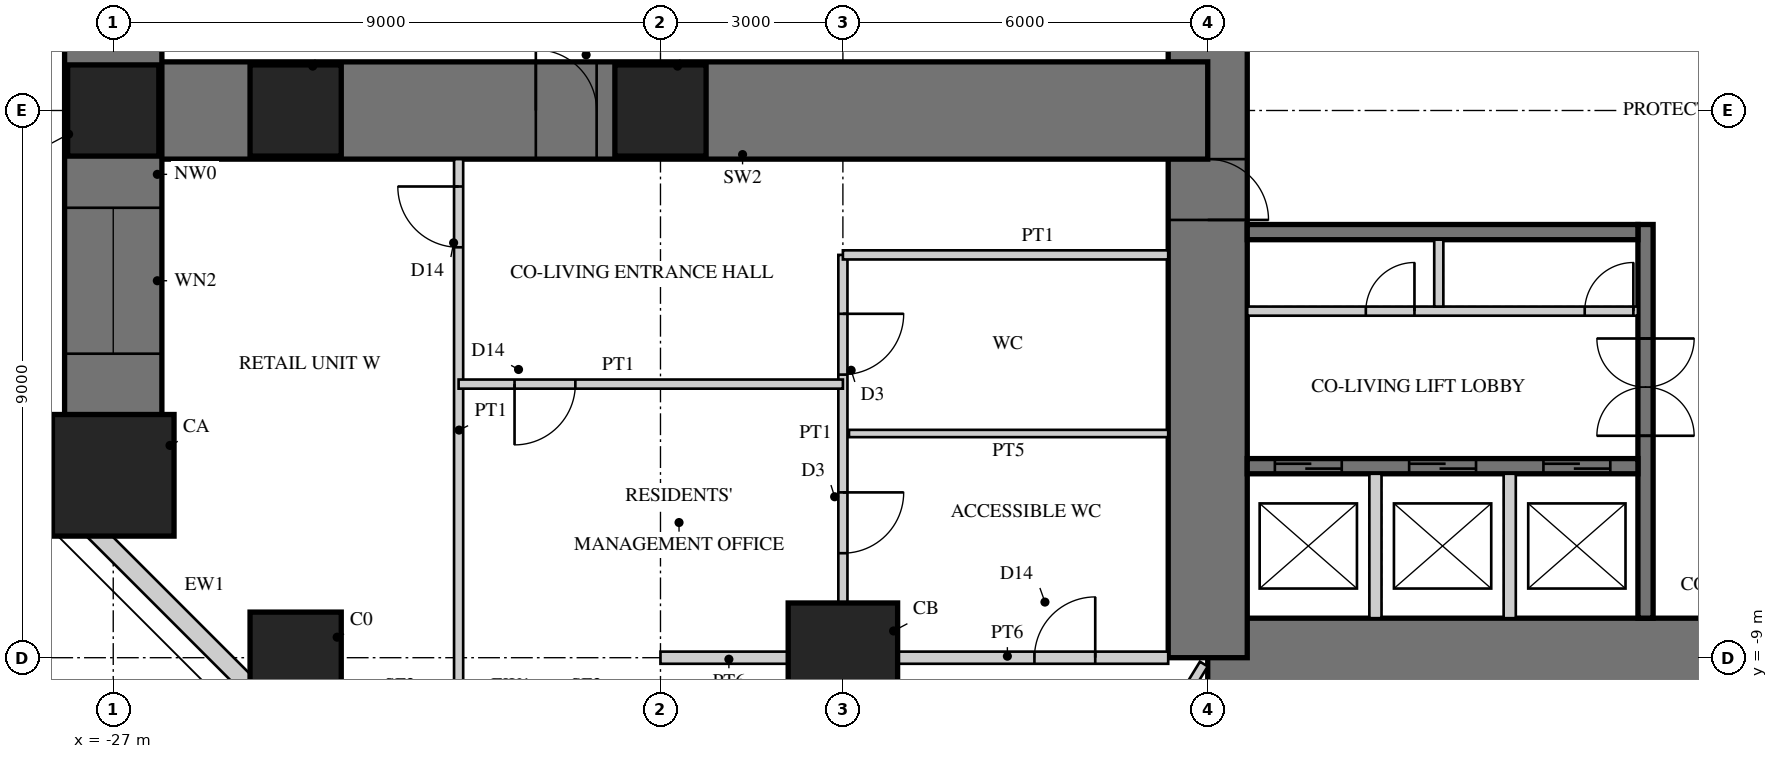
"""IFC4 building model, lengths in metres.
Left out: names, types, materials, properties, quantities, classifications, styles, units other than length and angle.
Written with IfcOpenShell. Run it as: python <this file> out.ifc"""

import sys

from ifc_helpers import new_model, si_unit, direction, frame, frame_2d, origin, origin_2d, place, context, subcontext, project, spatial, rectangle, hollow_rectangle, extrude, element, fill, save


model = new_model("IFC4")
c1 = context("Model", 3, precision=1e-05, world=origin(), true_north=direction((0.0, 1.0)))
c2 = subcontext(c1, "Body", "Model", "MODEL_VIEW")
j1 = project(units=[si_unit("LENGTHUNIT", "METRE"), si_unit("PLANEANGLEUNIT", "RADIAN")], contexts=[c1])
p1 = place(None, origin())
s1 = spatial("IfcSite", under=j1, at=p1, CompositionType="ELEMENT")
p2 = place(p1, origin())
s2 = spatial("IfcBuilding", under=s1, at=p2, CompositionType="ELEMENT")
p3 = place(p2, origin())
s3 = spatial("IfcBuildingStorey", under=s2, at=p3, CompositionType="ELEMENT", Elevation=0.0)
p4 = place(p3, frame((-9.0, -9.0, 0.0), z_axis=(0.0, 0.0, 1.0), x_axis=(1.0, 0.0, 0.0)))
e1 = element("IfcWall", 1, at=p4, inside=s3, PredefinedType="SHEAR", context=c2, shape_type="SweptSolid", body=[
    extrude(rectangle(XDim=18.0, YDim=1.3, at=frame_2d((9.0, 0.0))), origin(), (0.0, 0.0, 1.0), 5.0),
])
p5 = place(p4, frame((9.8, 0.0, 0.0)))
e2 = element("IfcOpeningElement", 2, at=p5, cuts=e1, PredefinedType="OPENING", context=c2, shape_type="SweptSolid", body=[
    extrude(rectangle(XDim=1.0, YDim=2.4, at=frame_2d((0.5, 1.2))), frame((0.0, 0.66, 0.0), z_axis=(0.0, -1.0, 0.0), x_axis=(1.0, 0.0, 0.0)), (0.0, 0.0, 1.0), 1.32),
])
p6 = place(p3, frame((-9.0, 9.0, 0.0), z_axis=(0.0, 0.0, 1.0), x_axis=(0.0, -1.0, 0.0)))
e3 = element("IfcWall", 3, at=p6, inside=s3, PredefinedType="SHEAR", context=c2, shape_type="SweptSolid", body=[
    extrude(rectangle(XDim=18.0, YDim=1.3, at=frame_2d((9.0, 0.0))), origin(), (0.0, 0.0, 1.0), 5.0),
])
p7 = place(p6, frame((9.8, 0.0, 0.0)))
e4 = element("IfcOpeningElement", 4, at=p7, cuts=e3, PredefinedType="OPENING", context=c2, shape_type="SweptSolid", body=[
    extrude(rectangle(XDim=1.0, YDim=2.4, at=frame_2d((0.5, 1.2))), frame((0.0, 0.66, 0.0), z_axis=(0.0, -1.0, 0.0), x_axis=(1.0, 0.0, 0.0)), (0.0, 0.0, 1.0), 1.32),
])
p8 = place(p3, frame((-1.8, -1.875, 0.0), z_axis=(0.0, 0.0, 1.0), x_axis=(0.0, -1.0, 0.0)))
e5 = element("IfcWall", 5, at=p8, inside=s3, PredefinedType="SHEAR", context=c2, shape_type="SweptSolid", body=[
    extrude(rectangle(XDim=6.475, YDim=0.25, at=frame_2d((3.238, 0.0))), origin(), (0.0, 0.0, 1.0), 5.0),
])
p9 = place(p8, frame((1.875, 0.0, 0.0)))
e6 = element("IfcOpeningElement", 6, at=p9, cuts=e5, PredefinedType="OPENING", context=c2, shape_type="SweptSolid", body=[
    extrude(rectangle(XDim=1.6, YDim=2.4, at=frame_2d((0.8, 1.2))), frame((0.0, 0.135, 0.0), z_axis=(0.0, -1.0, 0.0), x_axis=(1.0, 0.0, 0.0)), (0.0, 0.0, 1.0), 0.27),
])
p10 = place(p3, frame((-1.925, -2.0, 0.0), z_axis=(0.0, 0.0, 1.0), x_axis=(-1.0, 0.0, 0.0)))
e7 = element("IfcWall", 7, at=p10, inside=s3, PredefinedType="SHEAR", context=c2, shape_type="SweptSolid", body=[
    extrude(rectangle(XDim=6.425, YDim=0.25, at=frame_2d((3.212, 0.0))), origin(), (0.0, 0.0, 1.0), 5.0),
])
p11 = place(p3, frame((-1.925, -5.85, 0.0), z_axis=(0.0, 0.0, 1.0), x_axis=(-1.0, 0.0, 0.0)))
e8 = element("IfcWall", 8, at=p11, inside=s3, PredefinedType="SHEAR", context=c2, shape_type="SweptSolid", body=[
    extrude(rectangle(XDim=6.425, YDim=0.25, at=frame_2d((3.212, 0.0))), origin(), (0.0, 0.0, 1.0), 5.0),
])
p12 = place(p11, frame((0.454, 0.0, 0.0)))
e9 = element("IfcOpeningElement", 9, at=p12, cuts=e8, PredefinedType="OPENING", context=c2, shape_type="SweptSolid", body=[
    extrude(rectangle(XDim=1.1, YDim=2.2, at=frame_2d((0.55, 1.1))), frame((0.0, 0.135, 0.0), z_axis=(0.0, -1.0, 0.0), x_axis=(1.0, 0.0, 0.0)), (0.0, 0.0, 1.0), 0.27),
])
p13 = place(p11, frame((2.663, 0.0, 0.0)))
e10 = element("IfcOpeningElement", 10, at=p13, cuts=e8, PredefinedType="OPENING", context=c2, shape_type="SweptSolid", body=[
    extrude(rectangle(XDim=1.1, YDim=2.2, at=frame_2d((0.55, 1.1))), frame((0.0, 0.135, 0.0), z_axis=(0.0, -1.0, 0.0), x_axis=(1.0, 0.0, 0.0)), (0.0, 0.0, 1.0), 0.27),
])
p14 = place(p11, frame((4.871, 0.0, 0.0)))
e11 = element("IfcOpeningElement", 11, at=p14, cuts=e8, PredefinedType="OPENING", context=c2, shape_type="SweptSolid", body=[
    extrude(rectangle(XDim=1.1, YDim=2.2, at=frame_2d((0.55, 1.1))), frame((0.0, 0.135, 0.0), z_axis=(0.0, -1.0, 0.0), x_axis=(1.0, 0.0, 0.0)), (0.0, 0.0, 1.0), 0.27),
])
p15 = place(p3, frame((-1.925, -3.3, 0.0), z_axis=(0.0, 0.0, 1.0), x_axis=(-1.0, 0.0, 0.0)))
e12 = element("IfcWall", 12, at=p15, inside=s3, PredefinedType="PARTITIONING", context=c2, shape_type="SweptSolid", body=[
    extrude(rectangle(XDim=6.425, YDim=0.15, at=frame_2d((3.212, 0.0))), origin(), (0.0, 0.0, 1.0), 5.0),
])
p16 = place(p15, frame((0.075, 0.0, 0.0)))
e13 = element("IfcOpeningElement", 13, at=p16, cuts=e12, PredefinedType="OPENING", context=c2, shape_type="SweptSolid", body=[
    extrude(rectangle(XDim=0.8, YDim=2.1, at=frame_2d((0.4, 1.05))), frame((0.0, 0.085, 0.0), z_axis=(0.0, -1.0, 0.0), x_axis=(1.0, 0.0, 0.0)), (0.0, 0.0, 1.0), 0.17),
])
p17 = place(p15, frame((3.675, 0.0, 0.0)))
e14 = element("IfcOpeningElement", 14, at=p17, cuts=e12, PredefinedType="OPENING", context=c2, shape_type="SweptSolid", body=[
    extrude(rectangle(XDim=0.8, YDim=2.1, at=frame_2d((0.4, 1.05))), frame((0.0, 0.085, 0.0), z_axis=(0.0, -1.0, 0.0), x_axis=(1.0, 0.0, 0.0)), (0.0, 0.0, 1.0), 0.17),
])
p18 = place(p3, frame((-5.2, -2.125, 0.0), z_axis=(0.0, 0.0, 1.0), x_axis=(0.0, -1.0, 0.0)))
e15 = element("IfcWall", 15, at=p18, inside=s3, PredefinedType="PARTITIONING", context=c2, shape_type="SweptSolid", body=[
    extrude(rectangle(XDim=1.1, YDim=0.15, at=frame_2d((0.55, 0.0))), origin(), (0.0, 0.0, 1.0), 5.0),
])
for number, where, z_axis, x_axis in (
    (16, (-4.033, -5.975, 0.0), (0.0, 0.0, 1.0), (0.0, -1.0, 0.0)),
    (17, (-6.242, -5.975, 0.0), (0.0, 0.0, 1.0), (0.0, -1.0, 0.0)),
):
    element("IfcWall", number, at=place(p3, frame(where, z_axis=z_axis, x_axis=x_axis)), inside=s3, PredefinedType="PARTITIONING", context=c2, shape_type="SweptSolid", body=[
        extrude(rectangle(XDim=2.375, YDim=0.2, at=frame_2d((1.188, 0.0))), origin(), (0.0, 0.0, 1.0), 5.0),
    ])
p19 = place(p3, frame((-9.0, 0.0, 0.0), z_axis=(0.0, 0.0, 1.0), x_axis=(-1.0, 0.0, 0.0)))
e18 = element("IfcWall", 18, at=p19, inside=s3, PredefinedType="SHEAR", context=c2, shape_type="SweptSolid", body=[
    extrude(rectangle(XDim=18.0, YDim=1.6, at=frame_2d((9.0, 0.0))), origin(), (0.0, 0.0, 1.0), 5.0),
])
p20 = place(p19, frame((10.05, 0.0, 0.0)))
e19 = element("IfcOpeningElement", 19, at=p20, cuts=e18, PredefinedType="OPENING", context=c2, shape_type="SweptSolid", body=[
    extrude(rectangle(XDim=1.0, YDim=2.2, at=frame_2d((0.5, 1.1))), frame((0.0, 0.81, 0.0), z_axis=(0.0, -1.0, 0.0), x_axis=(1.0, 0.0, 0.0)), (0.0, 0.0, 1.0), 1.62),
])
p21 = place(p3, frame((-27.0, 6.0, 0.0), z_axis=(0.0, 0.0, 1.0), x_axis=(0.0, -1.0, 0.0)))
e20 = element("IfcWall", 20, at=p21, inside=s3, PredefinedType="SHEAR", context=c2, shape_type="SweptSolid", body=[
    extrude(rectangle(XDim=12.0, YDim=1.6, at=frame_2d((6.0, 0.0))), origin(), (0.0, 0.0, 1.0), 5.0),
])
p22 = place(p21, frame((2.75, 0.0, 0.0)))
e21 = element("IfcOpeningElement", 21, at=p22, cuts=e20, PredefinedType="OPENING", context=c2, shape_type="SweptSolid", body=[
    extrude(rectangle(XDim=2.0, YDim=2.6, at=frame_2d((1.0, 1.3))), frame((0.0, 0.81, 0.0), z_axis=(0.0, -1.0, 0.0), x_axis=(1.0, 0.0, 0.0)), (0.0, 0.0, 1.0), 1.62),
])
p23 = place(p21, frame((7.6, 0.0, 0.6)))
e22 = element("IfcOpeningElement", 22, at=p23, cuts=e20, PredefinedType="OPENING", context=c2, shape_type="SweptSolid", body=[
    extrude(rectangle(XDim=2.4, YDim=3.0, at=frame_2d((1.2, 1.5))), frame((0.0, 0.81, 0.0), z_axis=(0.0, -1.0, 0.0), x_axis=(1.0, 0.0, 0.0)), (0.0, 0.0, 1.0), 1.62),
])
p24 = place(p3, frame((-15.0, -9.0, 0.0), z_axis=(0.0, 0.0, 1.0), x_axis=(1.0, 0.0, 0.0)))
e23 = element("IfcColumn", 23, at=p24, inside=s3, PredefinedType="COLUMN", context=c2, shape_type="SweptSolid", body=[
    extrude(rectangle(XDim=1.8, YDim=1.8, at=origin_2d()), origin(), (0.0, 0.0, 1.0), 5.0),
])
for number, where, z_axis, x_axis in (
    (24, (-24.0, -9.0, 0.0), (0.0, 0.0, 1.0), (1.0, 0.0, 0.0)),
    (25, (-27.0, 0.0, 0.0), (0.0, 0.0, 1.0), (1.0, 0.0, 0.0)),
):
    element("IfcColumn", number, at=place(p3, frame(where, z_axis=z_axis, x_axis=x_axis)), inside=s3, PredefinedType="COLUMN", context=c2, shape_type="SweptSolid", body=[
        extrude(rectangle(XDim=1.5, YDim=1.5, at=origin_2d()), origin(), (0.0, 0.0, 1.0), 5.0),
    ])
p25 = place(p3, frame((-27.0, -6.0, 0.0), z_axis=(0.0, 0.0, 1.0), x_axis=(1.0, 0.0, 0.0)))
e26 = element("IfcColumn", 26, at=p25, inside=s3, PredefinedType="COLUMN", context=c2, shape_type="SweptSolid", body=[
    extrude(rectangle(XDim=2.0, YDim=2.0, at=origin_2d()), origin(), (0.0, 0.0, 1.0), 5.0),
])
for number, where, z_axis, x_axis in (
    (27, (-18.0, 0.0, 0.0), (0.0, 0.0, 1.0), (1.0, 0.0, 0.0)),
    (28, (-24.0, 0.0, 0.0), (0.0, 0.0, 1.0), (1.0, 0.0, 0.0)),
):
    element("IfcColumn", number, at=place(p3, frame(where, z_axis=z_axis, x_axis=x_axis)), inside=s3, PredefinedType="COLUMN", context=c2, shape_type="SweptSolid", body=[
        extrude(rectangle(XDim=1.5, YDim=1.5, at=origin_2d()), origin(), (0.0, 0.0, 1.0), 5.0),
    ])
p26 = place(p3, frame((-27.8, -6.43, 0.0), z_axis=(0.0, 0.0, 1.0), x_axis=(0.707106781187, -0.707106781187, 0.0)))
e29 = element("IfcWall", 29, at=p26, inside=s3, PredefinedType="SOLIDWALL", context=c2, shape_type="SweptSolid", body=[
    extrude(rectangle(XDim=4.865, YDim=0.3, at=frame_2d((2.432, 0.0))), origin(), (0.0, 0.0, 1.0), 4.8),
])
p27 = place(p3, frame((-15.0, -2.375, 0.0), z_axis=(0.0, 0.0, 1.0), x_axis=(0.0, -1.0, 0.0)))
e30 = element("IfcWall", 30, at=p27, inside=s3, PredefinedType="PARTITIONING", context=c2, shape_type="SweptSolid", body=[
    extrude(rectangle(XDim=5.875, YDim=0.15, at=frame_2d((2.938, 0.0))), origin(), (0.0, 0.0, 1.0), 3.85),
])
p28 = place(p27, frame((0.969, 0.0, 0.0)))
e31 = element("IfcOpeningElement", 31, at=p28, cuts=e30, PredefinedType="OPENING", context=c2, shape_type="SweptSolid", body=[
    extrude(rectangle(XDim=1.0, YDim=2.1, at=frame_2d((0.5, 1.05))), frame((0.0, 0.085, 0.0), z_axis=(0.0, -1.0, 0.0), x_axis=(1.0, 0.0, 0.0)), (0.0, 0.0, 1.0), 0.17),
])
p29 = place(p27, frame((3.906, 0.0, 0.0)))
e32 = element("IfcOpeningElement", 32, at=p29, cuts=e30, PredefinedType="OPENING", context=c2, shape_type="SweptSolid", body=[
    extrude(rectangle(XDim=1.0, YDim=2.1, at=frame_2d((0.5, 1.05))), frame((0.0, 0.085, 0.0), z_axis=(0.0, -1.0, 0.0), x_axis=(1.0, 0.0, 0.0)), (0.0, 0.0, 1.0), 0.17),
])
p30 = place(p3, frame((-9.65, -2.375, 0.0), z_axis=(0.0, 0.0, 1.0), x_axis=(-1.0, 0.0, 0.0)))
e33 = element("IfcWall", 33, at=p30, inside=s3, PredefinedType="PARTITIONING", context=c2, shape_type="SweptSolid", body=[
    extrude(rectangle(XDim=5.35, YDim=0.15, at=frame_2d((2.675, 0.0))), origin(), (0.0, 0.0, 1.0), 4.8),
])
p31 = place(p3, frame((-9.65, -5.312, 0.0), z_axis=(0.0, 0.0, 1.0), x_axis=(-1.0, 0.0, 0.0)))
e34 = element("IfcWall", 34, at=p31, inside=s3, PredefinedType="PLUMBINGWALL", context=c2, shape_type="SweptSolid", body=[
    extrude(rectangle(XDim=5.25, YDim=0.12, at=frame_2d((2.625, 0.0))), origin(), (0.0, 0.0, 1.0), 4.8),
])
p32 = place(p3, frame((-21.32, -0.8, 0.0), z_axis=(0.0, 0.0, 1.0), x_axis=(0.0, -1.0, 0.0)))
e35 = element("IfcWall", 35, at=p32, inside=s3, PredefinedType="PARTITIONING", context=c2, shape_type="SweptSolid", body=[
    extrude(rectangle(XDim=8.92, YDim=0.15, at=frame_2d((4.46, 0.0))), origin(), (0.0, 0.0, 1.0), 4.8),
])
p33 = place(p32, frame((0.45, 0.0, 0.0)))
e36 = element("IfcOpeningElement", 36, at=p33, cuts=e35, PredefinedType="OPENING", context=c2, shape_type="SweptSolid", body=[
    extrude(rectangle(XDim=1.0, YDim=2.2, at=frame_2d((0.5, 1.1))), frame((0.0, 0.085, 0.0), z_axis=(0.0, -1.0, 0.0), x_axis=(1.0, 0.0, 0.0)), (0.0, 0.0, 1.0), 0.17),
])
p34 = place(p3, frame((-15.0, -4.5, 0.0), z_axis=(0.0, 0.0, 1.0), x_axis=(-1.0, 0.0, 0.0)))
e37 = element("IfcWall", 37, at=p34, inside=s3, PredefinedType="PARTITIONING", context=c2, shape_type="SweptSolid", body=[
    extrude(rectangle(XDim=6.32, YDim=0.15, at=frame_2d((3.16, 0.0))), origin(), (0.0, 0.0, 1.0), 4.8),
])
p35 = place(p34, frame((4.4, 0.0, 0.0)))
e38 = element("IfcOpeningElement", 38, at=p35, cuts=e37, PredefinedType="OPENING", context=c2, shape_type="SweptSolid", body=[
    extrude(rectangle(XDim=1.0, YDim=2.2, at=frame_2d((0.5, 1.1))), frame((0.0, 0.085, 0.0), z_axis=(0.0, -1.0, 0.0), x_axis=(1.0, 0.0, 0.0)), (0.0, 0.0, 1.0), 0.17),
])
p36 = place(p3, frame((-9.064, -9.104, 0.0), z_axis=(0.0, 0.0, 1.0), x_axis=(-0.522444037035, -0.852673576562, 0.0)))
e39 = element("IfcWall", 39, at=p36, inside=s3, PredefinedType="PARTITIONING", context=c2, shape_type="SweptSolid", body=[
    extrude(rectangle(XDim=1.261, YDim=0.15, at=frame_2d((0.631, 0.0))), origin(), (0.0, 0.0, 1.0), 3.9),
])
p37 = place(p3, frame((-9.65, -9.0, 0.0), z_axis=(0.0, 0.0, 1.0), x_axis=(-1.0, 0.0, 0.0)))
e40 = element("IfcWall", 40, at=p37, inside=s3, PredefinedType="SOLIDWALL", context=c2, shape_type="SweptSolid", body=[
    extrude(rectangle(XDim=4.6, YDim=0.2, at=frame_2d((2.3, 0.0))), origin(), (0.0, 0.0, 1.0), 3.8),
])
p38 = place(p37, frame((1.2, 0.0, 0.0)))
e41 = element("IfcOpeningElement", 41, at=p38, cuts=e40, PredefinedType="OPENING", context=c2, shape_type="SweptSolid", body=[
    extrude(rectangle(XDim=1.0, YDim=2.2, at=frame_2d((0.5, 1.1))), frame((0.0, 0.11, 0.0), z_axis=(0.0, -1.0, 0.0), x_axis=(1.0, 0.0, 0.0)), (0.0, 0.0, 1.0), 0.22),
])
p39 = place(p3, frame((-15.75, -9.0, 0.0), z_axis=(0.0, 0.0, 1.0), x_axis=(-1.0, 0.0, 0.0)))
e42 = element("IfcWall", 42, at=p39, inside=s3, PredefinedType="SOLIDWALL", context=c2, shape_type="SweptSolid", body=[
    extrude(rectangle(XDim=2.25, YDim=0.2, at=frame_2d((1.125, 0.0))), origin(), (0.0, 0.0, 1.0), 3.8),
])
p40 = place(p23, origin())
e43 = element("IfcWindow", 43, at=p40, inside=s3, PartitioningType="SINGLE_PANEL", PredefinedType="WINDOW", context=c2, shape_type="SweptSolid", body=[
    extrude(hollow_rectangle(XDim=2.4, YDim=3.0, WallThickness=0.06, at=frame_2d((1.2, 1.5))), frame((0.0, 0.03, 0.0), z_axis=(0.0, -1.0, 0.0), x_axis=(1.0, 0.0, 0.0)), (0.0, 0.0, 1.0), 0.06),
    extrude(rectangle(XDim=2.279, YDim=2.879, at=frame_2d((1.2, 1.5))), frame((0.0, 0.03, 0.0), z_axis=(0.0, -1.0, 0.0), x_axis=(1.0, 0.0, 0.0)), (0.0, 0.0, 1.0), 0.06),
])
fill(e22, e43)
p41 = place(p28, origin())
e44 = element("IfcDoor", 44, at=p41, inside=s3, OperationType="SINGLE_SWING_LEFT", PredefinedType="DOOR", context=c2, shape_type="SweptSolid", body=[
    extrude(rectangle(XDim=1.0, YDim=2.1, at=frame_2d((0.5, 1.05))), frame((0.0, 0.025, 0.0), z_axis=(0.0, -1.0, 0.0), x_axis=(1.0, 0.0, 0.0)), (0.0, 0.0, 1.0), 0.05),
])
fill(e31, e44)
p42 = place(p29, origin())
e45 = element("IfcDoor", 45, at=p42, inside=s3, OperationType="SINGLE_SWING_LEFT", PredefinedType="DOOR", context=c2, shape_type="SweptSolid", body=[
    extrude(rectangle(XDim=1.0, YDim=2.1, at=frame_2d((0.5, 1.05))), frame((0.0, 0.025, 0.0), z_axis=(0.0, -1.0, 0.0), x_axis=(1.0, 0.0, 0.0)), (0.0, 0.0, 1.0), 0.05),
])
fill(e32, e45)
p43 = place(p33, frame((1.0, 0.0, 0.0), z_axis=(0.0, 0.0, 1.0), x_axis=(-1.0, 0.0, 0.0)))
e46 = element("IfcDoor", 46, at=p43, inside=s3, OperationType="SINGLE_SWING_RIGHT", PredefinedType="DOOR", context=c2, shape_type="SweptSolid", body=[
    extrude(rectangle(XDim=1.0, YDim=2.2, at=frame_2d((0.5, 1.1))), frame((0.0, 0.025, 0.0), z_axis=(0.0, -1.0, 0.0), x_axis=(1.0, 0.0, 0.0)), (0.0, 0.0, 1.0), 0.05),
])
fill(e36, e46)
p44 = place(p35, origin())
e47 = element("IfcDoor", 47, at=p44, inside=s3, OperationType="SINGLE_SWING_RIGHT", PredefinedType="DOOR", context=c2, shape_type="SweptSolid", body=[
    extrude(rectangle(XDim=1.0, YDim=2.2, at=frame_2d((0.5, 1.1))), frame((0.0, 0.025, 0.0), z_axis=(0.0, -1.0, 0.0), x_axis=(1.0, 0.0, 0.0)), (0.0, 0.0, 1.0), 0.05),
])
fill(e38, e47)
p45 = place(p38, frame((1.0, 0.0, 0.0), z_axis=(0.0, 0.0, 1.0), x_axis=(-1.0, 0.0, 0.0)))
e48 = element("IfcDoor", 48, at=p45, inside=s3, OperationType="SINGLE_SWING_RIGHT", PredefinedType="DOOR", context=c2, shape_type="SweptSolid", body=[
    extrude(rectangle(XDim=1.0, YDim=2.2, at=frame_2d((0.5, 1.1))), frame((0.0, 0.025, 0.0), z_axis=(0.0, -1.0, 0.0), x_axis=(1.0, 0.0, 0.0)), (0.0, 0.0, 1.0), 0.05),
])
fill(e41, e48)
p46 = place(p20, frame((1.0, 0.0, 0.0), z_axis=(0.0, 0.0, 1.0), x_axis=(-1.0, 0.0, 0.0)))
e49 = element("IfcDoor", 49, at=p46, inside=s3, OperationType="SINGLE_SWING_LEFT", PredefinedType="DOOR", context=c2, shape_type="SweptSolid", body=[
    extrude(rectangle(XDim=1.0, YDim=2.2, at=frame_2d((0.5, 1.1))), frame((0.0, 0.025, 0.0), z_axis=(0.0, -1.0, 0.0), x_axis=(1.0, 0.0, 0.0)), (0.0, 0.0, 1.0), 0.05),
])
fill(e19, e49)
p47 = place(p7, origin())
e50 = element("IfcDoor", 50, at=p47, inside=s3, OperationType="SINGLE_SWING_RIGHT", PredefinedType="DOOR", context=c2, shape_type="SweptSolid", body=[
    extrude(rectangle(XDim=1.0, YDim=2.4, at=frame_2d((0.5, 1.2))), frame((0.0, 0.055, 0.0), z_axis=(0.0, -1.0, 0.0), x_axis=(1.0, 0.0, 0.0)), (0.0, 0.0, 1.0), 0.05),
])
fill(e4, e50)
p48 = place(p12, origin())
e51 = element("IfcDoor", 51, at=p48, inside=s3, OperationType="DOUBLE_DOOR_SLIDING", PredefinedType="DOOR", context=c2, shape_type="SweptSolid", body=[
    extrude(rectangle(XDim=1.1, YDim=2.2, at=frame_2d((0.55, 1.1))), frame((0.0, 0.025, 0.0), z_axis=(0.0, -1.0, 0.0), x_axis=(1.0, 0.0, 0.0)), (0.0, 0.0, 1.0), 0.05),
])
fill(e9, e51)
p49 = place(p13, origin())
e52 = element("IfcDoor", 52, at=p49, inside=s3, OperationType="DOUBLE_DOOR_SLIDING", PredefinedType="DOOR", context=c2, shape_type="SweptSolid", body=[
    extrude(rectangle(XDim=1.1, YDim=2.2, at=frame_2d((0.55, 1.1))), frame((0.0, 0.025, 0.0), z_axis=(0.0, -1.0, 0.0), x_axis=(1.0, 0.0, 0.0)), (0.0, 0.0, 1.0), 0.05),
])
fill(e10, e52)
p50 = place(p14, origin())
e53 = element("IfcDoor", 53, at=p50, inside=s3, OperationType="DOUBLE_DOOR_SLIDING", PredefinedType="DOOR", context=c2, shape_type="SweptSolid", body=[
    extrude(rectangle(XDim=1.1, YDim=2.2, at=frame_2d((0.55, 1.1))), frame((0.0, 0.025, 0.0), z_axis=(0.0, -1.0, 0.0), x_axis=(1.0, 0.0, 0.0)), (0.0, 0.0, 1.0), 0.05),
])
fill(e11, e53)
p51 = place(p9, origin())
e54 = element("IfcDoor", 54, at=p51, inside=s3, OperationType="DOUBLE_DOOR_DOUBLE_SWING", PredefinedType="DOOR", context=c2, shape_type="SweptSolid", body=[
    extrude(rectangle(XDim=1.6, YDim=2.4, at=frame_2d((0.8, 1.2))), frame((0.0, 0.025, 0.0), z_axis=(0.0, -1.0, 0.0), x_axis=(1.0, 0.0, 0.0)), (0.0, 0.0, 1.0), 0.05),
])
fill(e6, e54)
p52 = place(p16, frame((0.8, 0.0, 0.0), z_axis=(0.0, 0.0, 1.0), x_axis=(-1.0, 0.0, 0.0)))
e55 = element("IfcDoor", 55, at=p52, inside=s3, OperationType="SINGLE_SWING_RIGHT", PredefinedType="DOOR", context=c2, shape_type="SweptSolid", body=[
    extrude(rectangle(XDim=0.8, YDim=2.1, at=frame_2d((0.4, 1.05))), frame((0.0, 0.025, 0.0), z_axis=(0.0, -1.0, 0.0), x_axis=(1.0, 0.0, 0.0)), (0.0, 0.0, 1.0), 0.05),
])
fill(e13, e55)
p53 = place(p17, frame((0.8, 0.0, 0.0), z_axis=(0.0, 0.0, 1.0), x_axis=(-1.0, 0.0, 0.0)))
e56 = element("IfcDoor", 56, at=p53, inside=s3, OperationType="SINGLE_SWING_RIGHT", PredefinedType="DOOR", context=c2, shape_type="SweptSolid", body=[
    extrude(rectangle(XDim=0.8, YDim=2.1, at=frame_2d((0.4, 1.05))), frame((0.0, 0.025, 0.0), z_axis=(0.0, -1.0, 0.0), x_axis=(1.0, 0.0, 0.0)), (0.0, 0.0, 1.0), 0.05),
])
fill(e14, e56)
save(model, sys.argv[1])
